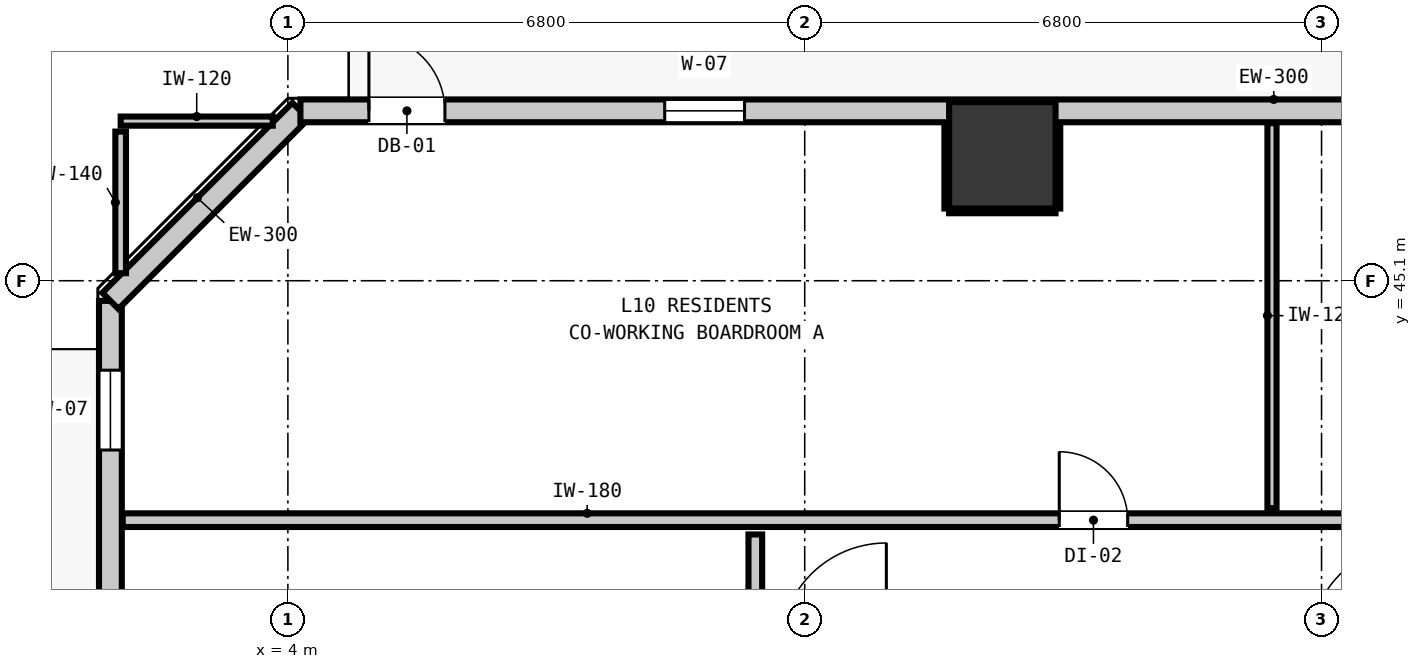
"""IFC4 building model, lengths in metres.
Left out: names, types, materials, properties, quantities, classifications, styles, units other than length and angle.
Written with IfcOpenShell. Run it as: python <this file> out.ifc"""

import sys

from ifc_helpers import new_model, si_unit, direction, frame, frame_2d, origin, origin_2d, place, context, subcontext, project, spatial, rectangle, extrude, element, fill, save


model = new_model("IFC4")
c1 = context("Model", 3, precision=1e-05, world=origin(), true_north=direction((0.0, 1.0)))
c2 = subcontext(c1, "Body", "Model", "MODEL_VIEW")
j1 = project(units=[si_unit("LENGTHUNIT", "METRE"), si_unit("PLANEANGLEUNIT", "RADIAN")], contexts=[c1])
p1 = place(None, origin())
s1 = spatial("IfcSite", under=j1, at=p1, CompositionType="ELEMENT")
p2 = place(p1, origin())
s2 = spatial("IfcBuilding", under=s1, at=p2, CompositionType="ELEMENT")
p3 = place(p2, frame((0.0, 0.0, 38.6)))
s3 = spatial("IfcBuildingStorey", under=s2, at=p3, CompositionType="ELEMENT", Elevation=38.6)
p4 = place(p3, frame((13.4, 46.75, 0.0), z_axis=(0.0, 0.0, 1.0), x_axis=(1.0, 0.0, 0.0)))
e1 = element("IfcColumn", 1, at=p4, inside=s3, PredefinedType="COLUMN", context=c2, shape_type="SweptSolid", body=[
    extrude(rectangle(XDim=1.4, YDim=1.4, at=origin_2d()), origin(), (0.0, 0.0, 1.0), 2.9),
])
p5 = place(p3, frame((1.665, 10.165, 0.0), z_axis=(0.0, 0.0, 1.0), x_axis=(0.0, 1.0, 0.0)))
e2 = element("IfcWall", 2, at=p5, inside=s3, PredefinedType="STANDARD", context=c2, shape_type="SweptSolid", body=[
    extrude(rectangle(XDim=34.67, YDim=0.3, at=frame_2d((17.335, 0.0))), origin(), (0.0, 0.0, 1.0), 2.9),
])
p6 = place(p5, frame((0.901, 0.0, 0.0)))
e3 = element("IfcOpeningElement", 3, at=p6, cuts=e2, PredefinedType="OPENING", context=c2, shape_type="SweptSolid", body=[
    extrude(rectangle(XDim=1.0, YDim=2.15, at=frame_2d((0.5, 1.075))), frame((0.0, 0.16, 0.0), z_axis=(0.0, -1.0, 0.0), x_axis=(1.0, 0.0, 0.0)), (0.0, 0.0, 1.0), 0.32),
])
p7 = place(p5, frame((32.708, 0.0, 0.85)))
e4 = element("IfcOpeningElement", 4, at=p7, cuts=e2, PredefinedType="OPENING", context=c2, shape_type="SweptSolid", body=[
    extrude(rectangle(XDim=1.05, YDim=1.65, at=frame_2d((0.525, 0.825))), frame((0.0, 0.16, 0.0), z_axis=(0.0, -1.0, 0.0), x_axis=(1.0, 0.0, 0.0)), (0.0, 0.0, 1.0), 0.32),
])
p8 = place(p5, frame((15.66, 0.0, 0.85)))
e5 = element("IfcOpeningElement", 5, at=p8, cuts=e2, PredefinedType="OPENING", context=c2, shape_type="SweptSolid", body=[
    extrude(rectangle(XDim=1.05, YDim=1.65, at=frame_2d((0.525, 0.825))), frame((0.0, 0.16, 0.0), z_axis=(0.0, -1.0, 0.0), x_axis=(1.0, 0.0, 0.0)), (0.0, 0.0, 1.0), 0.32),
])
p9 = place(p3, frame((1.665, 44.835, 0.0), z_axis=(0.0, 0.0, 1.0), x_axis=(0.707106781187, 0.707106781187, 0.0)))
e6 = element("IfcWall", 6, at=p9, inside=s3, PredefinedType="STANDARD", context=c2, shape_type="SweptSolid", body=[
    extrude(rectangle(XDim=3.536, YDim=0.3, at=frame_2d((1.768, 0.0))), origin(), (0.0, 0.0, 1.0), 2.9),
])
p10 = place(p3, frame((4.165, 47.335, 0.0), z_axis=(0.0, 0.0, 1.0), x_axis=(1.0, 0.0, 0.0)))
e7 = element("IfcWall", 7, at=p10, inside=s3, PredefinedType="STANDARD", context=c2, shape_type="SweptSolid", body=[
    extrude(rectangle(XDim=37.47, YDim=0.3, at=frame_2d((18.735, 0.0))), origin(), (0.0, 0.0, 1.0), 2.9),
])
p11 = place(p10, frame((0.901, 0.0, 0.0)))
e8 = element("IfcOpeningElement", 8, at=p11, cuts=e7, PredefinedType="OPENING", context=c2, shape_type="SweptSolid", body=[
    extrude(rectangle(XDim=1.0, YDim=2.15, at=frame_2d((0.5, 1.075))), frame((0.0, 0.16, 0.0), z_axis=(0.0, -1.0, 0.0), x_axis=(1.0, 0.0, 0.0)), (0.0, 0.0, 1.0), 0.32),
])
p12 = place(p10, frame((4.793, 0.0, 0.85)))
e9 = element("IfcOpeningElement", 9, at=p12, cuts=e7, PredefinedType="OPENING", context=c2, shape_type="SweptSolid", body=[
    extrude(rectangle(XDim=1.05, YDim=1.65, at=frame_2d((0.525, 0.825))), frame((0.0, 0.16, 0.0), z_axis=(0.0, -1.0, 0.0), x_axis=(1.0, 0.0, 0.0)), (0.0, 0.0, 1.0), 0.32),
])
p13 = place(p10, frame((19.77, 0.0, 0.85)))
e10 = element("IfcOpeningElement", 10, at=p13, cuts=e7, PredefinedType="OPENING", context=c2, shape_type="SweptSolid", body=[
    extrude(rectangle(XDim=1.05, YDim=1.65, at=frame_2d((0.525, 0.825))), frame((0.0, 0.16, 0.0), z_axis=(0.0, -1.0, 0.0), x_axis=(1.0, 0.0, 0.0)), (0.0, 0.0, 1.0), 0.32),
])
p14 = place(p10, frame((29.492, 0.0, 0.85)))
e11 = element("IfcOpeningElement", 11, at=p14, cuts=e7, PredefinedType="OPENING", context=c2, shape_type="SweptSolid", body=[
    extrude(rectangle(XDim=1.05, YDim=1.65, at=frame_2d((0.525, 0.825))), frame((0.0, 0.16, 0.0), z_axis=(0.0, -1.0, 0.0), x_axis=(1.0, 0.0, 0.0)), (0.0, 0.0, 1.0), 0.32),
])
p15 = place(p10, frame((26.442, 0.0, 0.85)))
e12 = element("IfcOpeningElement", 12, at=p15, cuts=e7, PredefinedType="OPENING", context=c2, shape_type="SweptSolid", body=[
    extrude(rectangle(XDim=1.05, YDim=1.65, at=frame_2d((0.525, 0.825))), frame((0.0, 0.16, 0.0), z_axis=(0.0, -1.0, 0.0), x_axis=(1.0, 0.0, 0.0)), (0.0, 0.0, 1.0), 0.32),
])
p16 = place(p10, frame((35.578, 0.0, 0.85)))
e13 = element("IfcOpeningElement", 13, at=p16, cuts=e7, PredefinedType="OPENING", context=c2, shape_type="SweptSolid", body=[
    extrude(rectangle(XDim=1.05, YDim=1.65, at=frame_2d((0.525, 0.825))), frame((0.0, 0.16, 0.0), z_axis=(0.0, -1.0, 0.0), x_axis=(1.0, 0.0, 0.0)), (0.0, 0.0, 1.0), 0.32),
])
p17 = place(p3, frame((1.827, 41.95, 0.0), z_axis=(0.0, 0.0, 1.0), x_axis=(1.0, 0.0, 0.0)))
e14 = element("IfcWall", 14, at=p17, inside=s3, PredefinedType="PARTITIONING", context=c2, shape_type="SweptSolid", body=[
    extrude(rectangle(XDim=42.146, YDim=0.18, at=frame_2d((21.073, 0.0))), origin(), (0.0, 0.0, 1.0), 2.9),
])
p18 = place(p17, frame((12.322, 0.0, 0.0)))
e15 = element("IfcOpeningElement", 15, at=p18, cuts=e14, PredefinedType="OPENING", context=c2, shape_type="SweptSolid", body=[
    extrude(rectangle(XDim=0.9, YDim=2.1, at=frame_2d((0.45, 1.05))), frame((0.0, 0.1, 0.0), z_axis=(0.0, -1.0, 0.0), x_axis=(1.0, 0.0, 0.0)), (0.0, 0.0, 1.0), 0.2),
])
p19 = place(p17, frame((19.957, 0.0, 0.0)))
e16 = element("IfcOpeningElement", 16, at=p19, cuts=e14, PredefinedType="OPENING", context=c2, shape_type="SweptSolid", body=[
    extrude(rectangle(XDim=0.9, YDim=2.1, at=frame_2d((0.45, 1.05))), frame((0.0, 0.1, 0.0), z_axis=(0.0, -1.0, 0.0), x_axis=(1.0, 0.0, 0.0)), (0.0, 0.0, 1.0), 0.2),
])
p20 = place(p17, frame((32.95, 0.0, 0.0)))
e17 = element("IfcOpeningElement", 17, at=p20, cuts=e14, PredefinedType="OPENING", context=c2, shape_type="SweptSolid", body=[
    extrude(rectangle(XDim=1.0, YDim=2.15, at=frame_2d((0.5, 1.075))), frame((0.0, 0.1, 0.0), z_axis=(0.0, -1.0, 0.0), x_axis=(1.0, 0.0, 0.0)), (0.0, 0.0, 1.0), 0.2),
])
p21 = place(p3, frame((1.8, 47.2, 0.0), z_axis=(0.0, 0.0, 1.0), x_axis=(1.0, 0.0, 0.0)))
e18 = element("IfcWall", 18, at=p21, inside=s3, PredefinedType="PARTITIONING", context=c2, shape_type="SweptSolid", body=[
    extrude(rectangle(XDim=2.001, YDim=0.12, at=frame_2d((1.0, 0.0))), origin(), (0.0, 0.0, 1.0), 2.9),
])
p22 = place(p3, frame((10.15, 40.438, 0.0), z_axis=(0.0, 0.0, 1.0), x_axis=(0.0, 1.0, 0.0)))
e19 = element("IfcWall", 19, at=p22, inside=s3, PredefinedType="PARTITIONING", context=c2, shape_type="SweptSolid", body=[
    extrude(rectangle(XDim=1.324, YDim=0.18, at=frame_2d((0.662, 0.0))), origin(), (0.0, 0.0, 1.0), 2.9),
])
p23 = place(p3, frame((1.8, 45.199, 0.0), z_axis=(0.0, 0.0, 1.0), x_axis=(0.0, 1.0, 0.0)))
e20 = element("IfcWall", 20, at=p23, inside=s3, PredefinedType="PARTITIONING", context=c2, shape_type="SweptSolid", body=[
    extrude(rectangle(XDim=1.863, YDim=0.14, at=frame_2d((0.932, 0.0))), origin(), (0.0, 0.0, 1.0), 2.9),
])
p24 = place(p3, frame((16.948, 42.108, 0.0), z_axis=(0.0, 0.0, 1.0), x_axis=(0.0, 1.0, 0.0)))
e21 = element("IfcWall", 21, at=p24, inside=s3, PredefinedType="PARTITIONING", context=c2, shape_type="SweptSolid", body=[
    extrude(rectangle(XDim=5.065, YDim=0.12, at=frame_2d((2.533, 0.0))), origin(), (0.0, 0.0, 1.0), 2.9),
])
p25 = place(p3, frame((12.7, 46.018, 0.0), z_axis=(0.0, 0.0, 1.0), x_axis=(1.0, 0.0, 0.0)))
e22 = element("IfcWall", 22, at=p25, inside=s3, PredefinedType="PARTITIONING", context=c2, shape_type="SweptSolid", body=[
    extrude(rectangle(XDim=1.4, YDim=0.06, at=frame_2d((0.7, 0.0))), origin(), (0.0, 0.0, 1.0), 1.45),
])
for number, where, z_axis, x_axis in (
    (23, (12.668, 46.05, 0.0), (0.0, 0.0, 1.0), (0.0, 1.0, 0.0)),
    (24, (14.132, 46.05, 0.0), (0.0, 0.0, 1.0), (0.0, 1.0, 0.0)),
):
    element("IfcWall", number, at=place(p3, frame(where, z_axis=z_axis, x_axis=x_axis)), inside=s3, PredefinedType="PARTITIONING", context=c2, shape_type="SweptSolid", body=[
        extrude(rectangle(XDim=1.12, YDim=0.06, at=frame_2d((0.56, 0.0))), origin(), (0.0, 0.0, 1.0), 1.45),
    ])
p26 = place(p11, origin())
e25 = element("IfcDoor", 25, at=p26, inside=s3, OperationType="SINGLE_SWING_LEFT", PredefinedType="DOOR", context=c2, shape_type="SweptSolid", body=[
    extrude(rectangle(XDim=1.0, YDim=2.15, at=frame_2d((0.5, 1.075))), frame((0.0, 0.025, 0.0), z_axis=(0.0, -1.0, 0.0), x_axis=(1.0, 0.0, 0.0)), (0.0, 0.0, 1.0), 0.05),
])
fill(e8, e25)
p27 = place(p7, origin())
e26 = element("IfcWindow", 26, at=p27, inside=s3, PartitioningType="SINGLE_PANEL", PredefinedType="WINDOW", context=c2, shape_type="SweptSolid", body=[
    extrude(rectangle(XDim=1.05, YDim=1.65, at=frame_2d((0.525, 0.825))), frame((0.0, 0.03, 0.0), z_axis=(0.0, -1.0, 0.0), x_axis=(1.0, 0.0, 0.0)), (0.0, 0.0, 1.0), 0.06),
])
fill(e4, e26)
p28 = place(p12, origin())
e27 = element("IfcWindow", 27, at=p28, inside=s3, PartitioningType="SINGLE_PANEL", PredefinedType="WINDOW", context=c2, shape_type="SweptSolid", body=[
    extrude(rectangle(XDim=1.05, YDim=1.65, at=frame_2d((0.525, 0.825))), frame((0.0, 0.03, 0.0), z_axis=(0.0, -1.0, 0.0), x_axis=(1.0, 0.0, 0.0)), (0.0, 0.0, 1.0), 0.06),
])
fill(e9, e27)
p29 = place(p18, origin())
e28 = element("IfcDoor", 28, at=p29, inside=s3, OperationType="SINGLE_SWING_LEFT", PredefinedType="DOOR", context=c2, shape_type="SweptSolid", body=[
    extrude(rectangle(XDim=0.9, YDim=2.1, at=frame_2d((0.45, 1.05))), frame((0.0, 0.025, 0.0), z_axis=(0.0, -1.0, 0.0), x_axis=(1.0, 0.0, 0.0)), (0.0, 0.0, 1.0), 0.05),
])
fill(e15, e28)
save(model, sys.argv[1])
